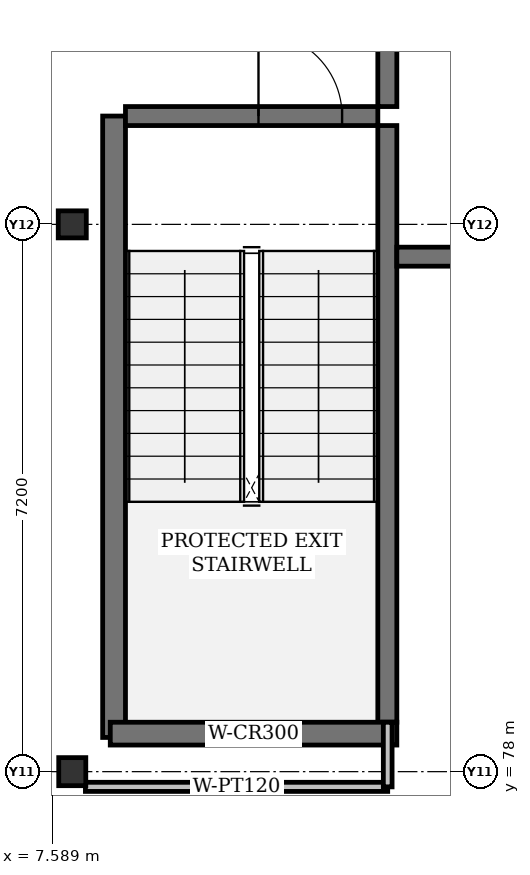
"""IFC4 building model, lengths in metres.
Left out: names, types, materials, properties, quantities, classifications, styles, units other than length and angle.
Written with IfcOpenShell. Run it as: python <this file> out.ifc"""

import sys

from ifc_helpers import new_model, si_unit, direction, frame, frame_2d, origin, origin_2d, place, context, subcontext, project, spatial, rectangle, i_section, extrude, element, fill, save


model = new_model("IFC4")
c1 = context("Model", 3, precision=1e-05, world=origin(), true_north=direction((0.0, 1.0)))
c2 = subcontext(c1, "Body", "Model", "MODEL_VIEW")
j1 = project(units=[si_unit("LENGTHUNIT", "METRE"), si_unit("PLANEANGLEUNIT", "RADIAN")], contexts=[c1])
p1 = place(None, origin())
s1 = spatial("IfcSite", under=j1, at=p1, CompositionType="ELEMENT")
p2 = place(p1, origin())
s2 = spatial("IfcBuilding", under=s1, at=p2, CompositionType="ELEMENT")
p3 = place(p2, frame((0.0, 0.0, 51.9)))
s3 = spatial("IfcBuildingStorey", under=s2, at=p3, CompositionType="ELEMENT", Elevation=51.9)
for number, where, z_axis, x_axis in (
    (1, (7.85, 78.0, 0.0), (0.0, 0.0, 1.0), (0.0, 1.0, 0.0)),
    (2, (7.85, 85.2, 0.0), (0.0, 0.0, 1.0), (1.0, 0.0, 0.0)),
):
    element("IfcColumn", number, at=place(p3, frame(where, z_axis=z_axis, x_axis=x_axis)), inside=s3, PredefinedType="COLUMN", context=c2, shape_type="SweptSolid", body=[
        extrude(i_section(OverallWidth=0.369, OverallDepth=0.356, WebThickness=0.011, FlangeThickness=0.018, FilletRadius=0.015, at=origin_2d()), origin(), (0.0, 0.0, 1.0), 4.2),
    ])
p4 = place(p3, frame((8.4, 78.45, 0.0), z_axis=(0.0, 0.0, 1.0), x_axis=(0.0, 1.0, 0.0)))
e3 = element("IfcWall", 3, at=p4, inside=s3, PredefinedType="SHEAR", context=c2, shape_type="SweptSolid", body=[
    extrude(rectangle(XDim=8.175, YDim=0.3, at=frame_2d((4.087, 0.0))), origin(), (0.0, 0.0, 1.0), 4.2),
])
p5 = place(p3, frame((11.995, 78.65, 0.0), z_axis=(0.0, 0.0, 1.0), x_axis=(0.0, 1.0, 0.0)))
e4 = element("IfcWall", 4, at=p5, inside=s3, PredefinedType="SHEAR", context=c2, shape_type="SweptSolid", body=[
    extrude(rectangle(XDim=7.85, YDim=0.25, at=frame_2d((3.925, 0.0))), origin(), (0.0, 0.0, 1.0), 4.2),
])
p6 = place(p3, frame((11.995, 86.75, 0.0), z_axis=(0.0, 0.0, 1.0), x_axis=(0.0, 1.0, 0.0)))
e5 = element("IfcWall", 5, at=p6, inside=s3, PredefinedType="SHEAR", context=c2, shape_type="SweptSolid", body=[
    extrude(rectangle(XDim=3.9, YDim=0.25, at=frame_2d((1.95, 0.0))), origin(), (0.0, 0.0, 1.0), 4.2),
])
p7 = place(p6, frame((1.3, 0.0, 0.0)))
e6 = element("IfcOpeningElement", 6, at=p7, cuts=e5, PredefinedType="OPENING", context=c2, shape_type="SweptSolid", body=[
    extrude(rectangle(XDim=1.25, YDim=2.2, at=frame_2d((0.625, 1.1))), frame((0.0, 0.125, 0.0), z_axis=(0.0, -1.0, 0.0), x_axis=(1.0, 0.0, 0.0)), (0.0, 0.0, 1.0), 0.25),
])
p8 = place(p3, frame((8.35, 78.5, 0.0), z_axis=(0.0, 0.0, 1.0), x_axis=(1.0, 0.0, 0.0)))
e7 = element("IfcWall", 7, at=p8, inside=s3, PredefinedType="SHEAR", context=c2, shape_type="SweptSolid", body=[
    extrude(rectangle(XDim=3.77, YDim=0.3, at=frame_2d((1.885, 0.0))), origin(), (0.0, 0.0, 1.0), 4.2),
])
p9 = place(p3, frame((8.55, 86.625, 0.0), z_axis=(0.0, 0.0, 1.0), x_axis=(1.0, 0.0, 0.0)))
e8 = element("IfcWall", 8, at=p9, inside=s3, PredefinedType="SHEAR", context=c2, shape_type="SweptSolid", body=[
    extrude(rectangle(XDim=3.32, YDim=0.25, at=frame_2d((1.66, 0.0))), origin(), (0.0, 0.0, 1.0), 4.2),
])
p10 = place(p9, frame((1.75, 0.0, 0.0)))
e9 = element("IfcOpeningElement", 9, at=p10, cuts=e8, PredefinedType="OPENING", context=c2, shape_type="SweptSolid", body=[
    extrude(rectangle(XDim=1.1, YDim=2.15, at=frame_2d((0.55, 1.075))), frame((0.0, 0.125, 0.0), z_axis=(0.0, -1.0, 0.0), x_axis=(1.0, 0.0, 0.0)), (0.0, 0.0, 1.0), 0.25),
])
p11 = place(p3, frame((12.12, 84.775, 0.0), z_axis=(0.0, 0.0, 1.0), x_axis=(1.0, 0.0, 0.0)))
e10 = element("IfcWall", 10, at=p11, inside=s3, PredefinedType="SHEAR", context=c2, shape_type="SweptSolid", body=[
    extrude(rectangle(XDim=4.03, YDim=0.25, at=frame_2d((2.015, 0.0))), origin(), (0.0, 0.0, 1.0), 4.2),
])
p12 = place(p11, frame((1.3, 0.0, 0.0)))
e11 = element("IfcOpeningElement", 11, at=p12, cuts=e10, PredefinedType="OPENING", context=c2, shape_type="SweptSolid", body=[
    extrude(rectangle(XDim=1.4, YDim=2.25, at=frame_2d((0.7, 1.125))), frame((0.0, 0.125, 0.0), z_axis=(0.0, -1.0, 0.0), x_axis=(1.0, 0.0, 0.0)), (0.0, 0.0, 1.0), 0.25),
])
p13 = place(p3, frame((8.023, 77.8, 0.0), z_axis=(0.0, 0.0, 1.0), x_axis=(1.0, 0.0, 0.0)))
e12 = element("IfcWall", 12, at=p13, inside=s3, PredefinedType="PARTITIONING", context=c2, shape_type="SweptSolid", body=[
    extrude(rectangle(XDim=3.977, YDim=0.12, at=frame_2d((1.989, 0.0))), origin(), (0.0, 0.0, 1.0), 3.451),
])
p14 = place(p3, frame((12.0, 77.8, 0.0), z_axis=(0.0, 0.0, 1.0), x_axis=(0.0, 1.0, 0.0)))
e13 = element("IfcWall", 13, at=p14, inside=s3, PredefinedType="PARTITIONING", context=c2, shape_type="SweptSolid", body=[
    extrude(rectangle(XDim=0.85, YDim=0.115, at=frame_2d((0.425, 0.0))), origin(), (0.0, 0.0, 1.0), 3.451),
])
p15 = place(p10, origin())
e14 = element("IfcDoor", 14, at=p15, inside=s3, OperationType="SINGLE_SWING_LEFT", PredefinedType="DOOR", context=c2, shape_type="SweptSolid", body=[
    extrude(rectangle(XDim=1.1, YDim=2.15, at=frame_2d((0.55, 1.075))), frame((0.0, 0.025, 0.0), z_axis=(0.0, -1.0, 0.0), x_axis=(1.0, 0.0, 0.0)), (0.0, 0.0, 1.0), 0.05),
])
fill(e9, e14)
save(model, sys.argv[1])
